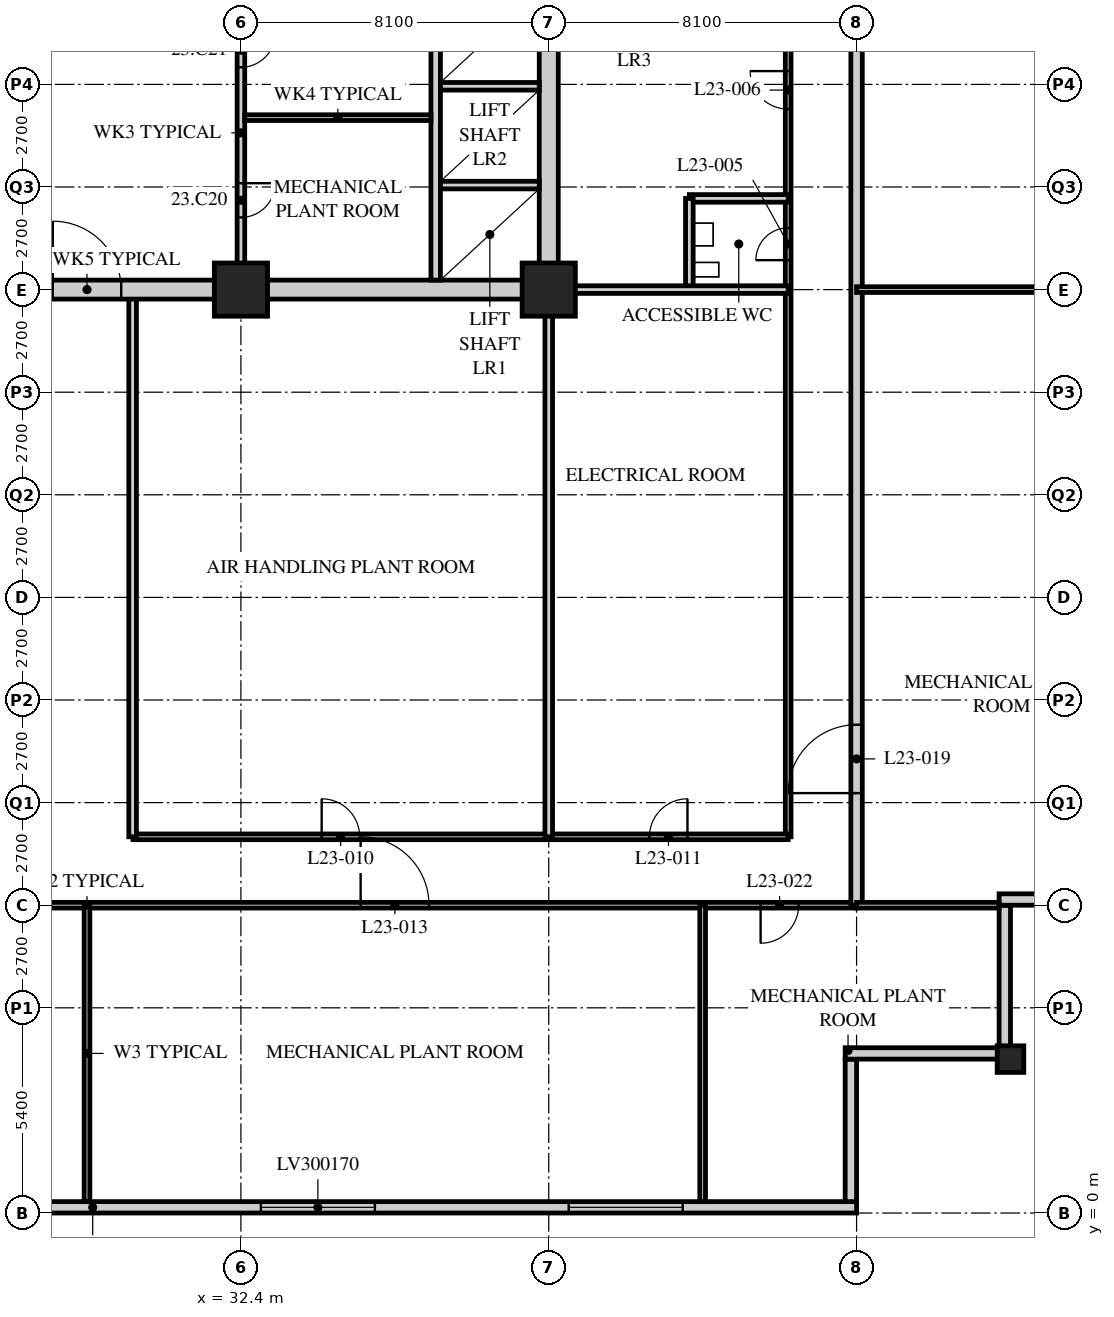
"""IFC4 building model, lengths in metres.
Left out: names, types, materials, properties, quantities, classifications, styles, units other than length and angle.
Written with IfcOpenShell. Run it as: python <this file> out.ifc"""

import sys

from ifc_helpers import new_model, si_unit, direction, frame, frame_2d, origin, origin_2d, place, context, subcontext, project, spatial, rectangle, hollow_rectangle, extrude, element, fill, save


model = new_model("IFC4")
c1 = context("Model", 3, precision=1e-05, world=origin(), true_north=direction((0.0, 1.0)))
c2 = subcontext(c1, "Body", "Model", "MODEL_VIEW")
j1 = project(units=[si_unit("LENGTHUNIT", "METRE"), si_unit("PLANEANGLEUNIT", "RADIAN")], contexts=[c1])
p1 = place(None, origin())
s1 = spatial("IfcSite", under=j1, at=p1, CompositionType="ELEMENT")
p2 = place(p1, origin())
s2 = spatial("IfcBuilding", under=s1, at=p2, CompositionType="ELEMENT")
p3 = place(p2, frame((0.0, 0.0, 90.8)))
s3 = spatial("IfcBuildingStorey", under=s2, at=p3, CompositionType="ELEMENT", Elevation=90.8)
for number, where, z_axis, x_axis in (
    (1, (32.4, 24.3, 0.0), (0.0, 0.0, 1.0), (1.0, 0.0, 0.0)),
    (2, (40.5, 24.3, 0.0), (0.0, 0.0, 1.0), (1.0, 0.0, 0.0)),
):
    element("IfcColumn", number, at=place(p3, frame(where, z_axis=z_axis, x_axis=x_axis)), inside=s3, PredefinedType="COLUMN", context=c2, shape_type="SweptSolid", body=[
        extrude(hollow_rectangle(XDim=1.4, YDim=1.4, WallThickness=0.12, at=origin_2d()), origin(), (0.0, 0.0, 1.0), 7.2),
    ])
p4 = place(p3, frame((52.65, 4.05, 0.0), z_axis=(0.0, 0.0, 1.0), x_axis=(1.0, 0.0, 0.0)))
e3 = element("IfcColumn", 3, at=p4, inside=s3, PredefinedType="COLUMN", context=c2, shape_type="SweptSolid", body=[
    extrude(hollow_rectangle(XDim=0.7, YDim=0.7, WallThickness=0.07, at=origin_2d()), origin(), (0.0, 0.0, 1.0), 7.2),
])
p5 = place(p3, frame((8.4, 0.15, 0.0), z_axis=(0.0, 0.0, 1.0), x_axis=(1.0, 0.0, 0.0)))
e4 = element("IfcWall", 4, at=p5, inside=s3, PredefinedType="SOLIDWALL", context=c2, shape_type="SweptSolid", body=[
    extrude(rectangle(XDim=40.2, YDim=0.3, at=frame_2d((20.1, 0.0))), origin(), (0.0, 0.0, 1.0), 5.85),
])
p6 = place(p5, frame((4.275, 0.0, 1.0)))
e5 = element("IfcOpeningElement", 5, at=p6, cuts=e4, PredefinedType="OPENING", context=c2, shape_type="SweptSolid", body=[
    extrude(rectangle(XDim=3.0, YDim=1.7, at=frame_2d((1.5, 0.85))), frame((0.0, 0.16, 0.0), z_axis=(0.0, -1.0, 0.0), x_axis=(1.0, 0.0, 0.0)), (0.0, 0.0, 1.0), 0.32),
])
p7 = place(p5, frame((12.375, 0.0, 1.0)))
e6 = element("IfcOpeningElement", 6, at=p7, cuts=e4, PredefinedType="OPENING", context=c2, shape_type="SweptSolid", body=[
    extrude(rectangle(XDim=3.0, YDim=1.7, at=frame_2d((1.5, 0.85))), frame((0.0, 0.16, 0.0), z_axis=(0.0, -1.0, 0.0), x_axis=(1.0, 0.0, 0.0)), (0.0, 0.0, 1.0), 0.32),
])
p8 = place(p5, frame((24.525, 0.0, 1.0)))
e7 = element("IfcOpeningElement", 7, at=p8, cuts=e4, PredefinedType="OPENING", context=c2, shape_type="SweptSolid", body=[
    extrude(rectangle(XDim=3.0, YDim=1.7, at=frame_2d((1.5, 0.85))), frame((0.0, 0.16, 0.0), z_axis=(0.0, -1.0, 0.0), x_axis=(1.0, 0.0, 0.0)), (0.0, 0.0, 1.0), 0.32),
])
p9 = place(p5, frame((32.625, 0.0, 1.0)))
e8 = element("IfcOpeningElement", 8, at=p9, cuts=e4, PredefinedType="OPENING", context=c2, shape_type="SweptSolid", body=[
    extrude(rectangle(XDim=3.0, YDim=1.7, at=frame_2d((1.5, 0.85))), frame((0.0, 0.16, 0.0), z_axis=(0.0, -1.0, 0.0), x_axis=(1.0, 0.0, 0.0)), (0.0, 0.0, 1.0), 0.32),
])
p10 = place(p3, frame((48.45, 0.3, 0.0), z_axis=(0.0, 0.0, 1.0), x_axis=(0.0, 1.0, 0.0)))
e9 = element("IfcWall", 9, at=p10, inside=s3, PredefinedType="SOLIDWALL", context=c2, shape_type="SweptSolid", body=[
    extrude(rectangle(XDim=3.75, YDim=0.3, at=frame_2d((1.875, 0.0))), origin(), (0.0, 0.0, 1.0), 5.85),
])
p11 = place(p3, frame((48.3, 4.2, 0.0), z_axis=(0.0, 0.0, 1.0), x_axis=(1.0, 0.0, 0.0)))
e10 = element("IfcWall", 10, at=p11, inside=s3, PredefinedType="SOLIDWALL", context=c2, shape_type="SweptSolid", body=[
    extrude(rectangle(XDim=4.35, YDim=0.3, at=frame_2d((2.175, 0.0))), origin(), (0.0, 0.0, 1.0), 6.25),
])
p12 = place(p3, frame((52.5, 4.35, 0.0), z_axis=(0.0, 0.0, 1.0), x_axis=(0.0, 1.0, 0.0)))
e11 = element("IfcWall", 11, at=p12, inside=s3, PredefinedType="SOLIDWALL", context=c2, shape_type="SweptSolid", body=[
    extrude(rectangle(XDim=3.75, YDim=0.3, at=frame_2d((1.875, 0.0))), origin(), (0.0, 0.0, 1.0), 6.25),
])
p13 = place(p3, frame((52.35, 8.25, 0.0), z_axis=(0.0, 0.0, 1.0), x_axis=(1.0, 0.0, 0.0)))
e12 = element("IfcWall", 12, at=p13, inside=s3, PredefinedType="SOLIDWALL", context=c2, shape_type="SweptSolid", body=[
    extrude(rectangle(XDim=4.35, YDim=0.3, at=frame_2d((2.175, 0.0))), origin(), (0.0, 0.0, 1.0), 6.95),
])
p14 = place(p3, frame((8.1, 8.1, 0.0), z_axis=(0.0, 0.0, 1.0), x_axis=(1.0, 0.0, 0.0)))
e13 = element("IfcWall", 13, at=p14, inside=s3, PredefinedType="PARTITIONING", context=c2, shape_type="SweptSolid", body=[
    extrude(rectangle(XDim=40.5, YDim=0.15, at=frame_2d((20.25, 0.0))), origin(), (0.0, 0.0, 1.0), 6.95),
])
p15 = place(p14, frame((11.25, 0.0, 0.0)))
e14 = element("IfcOpeningElement", 14, at=p15, cuts=e13, PredefinedType="OPENING", context=c2, shape_type="SweptSolid", body=[
    extrude(rectangle(XDim=1.8, YDim=2.4, at=frame_2d((0.9, 1.2))), frame((0.0, 0.085, 0.0), z_axis=(0.0, -1.0, 0.0), x_axis=(1.0, 0.0, 0.0)), (0.0, 0.0, 1.0), 0.17),
])
p16 = place(p14, frame((27.45, 0.0, 0.0)))
e15 = element("IfcOpeningElement", 15, at=p16, cuts=e13, PredefinedType="OPENING", context=c2, shape_type="SweptSolid", body=[
    extrude(rectangle(XDim=1.8, YDim=2.4, at=frame_2d((0.9, 1.2))), frame((0.0, 0.085, 0.0), z_axis=(0.0, -1.0, 0.0), x_axis=(1.0, 0.0, 0.0)), (0.0, 0.0, 1.0), 0.17),
])
p17 = place(p14, frame((1.525, 0.0, 0.0)))
e16 = element("IfcOpeningElement", 16, at=p17, cuts=e13, PredefinedType="OPENING", context=c2, shape_type="SweptSolid", body=[
    extrude(rectangle(XDim=1.0, YDim=2.1, at=frame_2d((0.5, 1.05))), frame((0.0, 0.085, 0.0), z_axis=(0.0, -1.0, 0.0), x_axis=(1.0, 0.0, 0.0)), (0.0, 0.0, 1.0), 0.17),
])
p18 = place(p14, frame((37.975, 0.0, 0.0)))
e17 = element("IfcOpeningElement", 17, at=p18, cuts=e13, PredefinedType="OPENING", context=c2, shape_type="SweptSolid", body=[
    extrude(rectangle(XDim=1.0, YDim=2.1, at=frame_2d((0.5, 1.05))), frame((0.0, 0.085, 0.0), z_axis=(0.0, -1.0, 0.0), x_axis=(1.0, 0.0, 0.0)), (0.0, 0.0, 1.0), 0.17),
])
p19 = place(p3, frame((48.6, 8.1, 0.0), z_axis=(0.0, 0.0, 1.0), x_axis=(0.0, 1.0, 0.0)))
e18 = element("IfcWall", 18, at=p19, inside=s3, PredefinedType="PARTITIONING", context=c2, shape_type="SweptSolid", body=[
    extrude(rectangle(XDim=34.2, YDim=0.3, at=frame_2d((17.1, 0.0))), origin(), (0.0, 0.0, 1.0), 5.85),
])
p20 = place(p19, frame((2.95, 0.0, 0.0)))
e19 = element("IfcOpeningElement", 19, at=p20, cuts=e18, PredefinedType="OPENING", context=c2, shape_type="SweptSolid", body=[
    extrude(rectangle(XDim=1.8, YDim=2.4, at=frame_2d((0.9, 1.2))), frame((0.0, 0.16, 0.0), z_axis=(0.0, -1.0, 0.0), x_axis=(1.0, 0.0, 0.0)), (0.0, 0.0, 1.0), 0.32),
])
p21 = place(p19, frame((27.3, 0.0, 0.0)))
e20 = element("IfcOpeningElement", 20, at=p21, cuts=e18, PredefinedType="OPENING", context=c2, shape_type="SweptSolid", body=[
    extrude(rectangle(XDim=1.8, YDim=2.4, at=frame_2d((0.9, 1.2))), frame((0.0, 0.16, 0.0), z_axis=(0.0, -1.0, 0.0), x_axis=(1.0, 0.0, 0.0)), (0.0, 0.0, 1.0), 0.32),
])
p22 = place(p3, frame((46.8, 9.9, 0.0), z_axis=(0.0, 0.0, 1.0), x_axis=(0.0, 1.0, 0.0)))
e21 = element("IfcWall", 21, at=p22, inside=s3, PredefinedType="PARTITIONING", context=c2, shape_type="SweptSolid", body=[
    extrude(rectangle(XDim=30.6, YDim=0.15, at=frame_2d((15.3, 0.0))), origin(), (0.0, 0.0, 1.0), 6.95),
])
p23 = place(p22, frame((15.175, 0.0, 0.0)))
e22 = element("IfcOpeningElement", 22, at=p23, cuts=e21, PredefinedType="OPENING", context=c2, shape_type="SweptSolid", body=[
    extrude(rectangle(XDim=0.85, YDim=2.1, at=frame_2d((0.425, 1.05))), frame((0.0, 0.085, 0.0), z_axis=(0.0, -1.0, 0.0), x_axis=(1.0, 0.0, 0.0)), (0.0, 0.0, 1.0), 0.17),
])
p24 = place(p22, frame((19.15, 0.0, 0.0)))
e23 = element("IfcOpeningElement", 23, at=p24, cuts=e21, PredefinedType="OPENING", context=c2, shape_type="SweptSolid", body=[
    extrude(rectangle(XDim=1.0, YDim=2.1, at=frame_2d((0.5, 1.05))), frame((0.0, 0.085, 0.0), z_axis=(0.0, -1.0, 0.0), x_axis=(1.0, 0.0, 0.0)), (0.0, 0.0, 1.0), 0.17),
])
p25 = place(p22, frame((26.05, 0.0, 0.0)))
e24 = element("IfcOpeningElement", 24, at=p25, cuts=e21, PredefinedType="OPENING", context=c2, shape_type="SweptSolid", body=[
    extrude(rectangle(XDim=1.0, YDim=2.1, at=frame_2d((0.5, 1.05))), frame((0.0, 0.085, 0.0), z_axis=(0.0, -1.0, 0.0), x_axis=(1.0, 0.0, 0.0)), (0.0, 0.0, 1.0), 0.17),
])
p26 = place(p3, frame((29.56, 9.9, 0.0), z_axis=(0.0, 0.0, 1.0), x_axis=(1.0, 0.0, 0.0)))
e25 = element("IfcWall", 25, at=p26, inside=s3, PredefinedType="PARTITIONING", context=c2, shape_type="SweptSolid", body=[
    extrude(rectangle(XDim=17.24, YDim=0.15, at=frame_2d((8.62, 0.0))), origin(), (0.0, 0.0, 1.0), 6.95),
])
p27 = place(p26, frame((4.965, 0.0, 0.0)))
e26 = element("IfcOpeningElement", 26, at=p27, cuts=e25, PredefinedType="OPENING", context=c2, shape_type="SweptSolid", body=[
    extrude(rectangle(XDim=1.0, YDim=2.1, at=frame_2d((0.5, 1.05))), frame((0.0, 0.085, 0.0), z_axis=(0.0, -1.0, 0.0), x_axis=(1.0, 0.0, 0.0)), (0.0, 0.0, 1.0), 0.17),
])
p28 = place(p26, frame((13.59, 0.0, 0.0)))
e27 = element("IfcOpeningElement", 27, at=p28, cuts=e25, PredefinedType="OPENING", context=c2, shape_type="SweptSolid", body=[
    extrude(rectangle(XDim=1.0, YDim=2.1, at=frame_2d((0.5, 1.05))), frame((0.0, 0.085, 0.0), z_axis=(0.0, -1.0, 0.0), x_axis=(1.0, 0.0, 0.0)), (0.0, 0.0, 1.0), 0.17),
])
p29 = place(p3, frame((46.8, 26.7, 0.0), z_axis=(0.0, 0.0, 1.0), x_axis=(-1.0, 0.0, 0.0)))
e28 = element("IfcWall", 28, at=p29, inside=s3, PredefinedType="SOLIDWALL", context=c2, shape_type="SweptSolid", body=[
    extrude(rectangle(XDim=2.6, YDim=0.2, at=frame_2d((1.3, 0.0))), origin(), (0.0, 0.0, 1.0), 6.95),
])
p30 = place(p3, frame((44.2, 24.3, 0.0), z_axis=(0.0, 0.0, 1.0), x_axis=(0.0, 1.0, 0.0)))
e29 = element("IfcWall", 29, at=p30, inside=s3, PredefinedType="SOLIDWALL", context=c2, shape_type="SweptSolid", body=[
    extrude(rectangle(XDim=2.4, YDim=0.2, at=frame_2d((1.2, 0.0))), origin(), (0.0, 0.0, 1.0), 6.95),
])
p31 = place(p3, frame((40.5, 9.9, 0.0), z_axis=(0.0, 0.0, 1.0), x_axis=(0.0, 1.0, 0.0)))
e30 = element("IfcWall", 30, at=p31, inside=s3, PredefinedType="SOLIDWALL", context=c2, shape_type="SweptSolid", body=[
    extrude(rectangle(XDim=14.4, YDim=0.2, at=frame_2d((7.2, 0.0))), origin(), (0.0, 0.0, 1.0), 5.85),
])
p32 = place(p3, frame((29.55, 9.9, 0.0), z_axis=(0.0, 0.0, 1.0), x_axis=(0.0, 1.0, 0.0)))
e31 = element("IfcWall", 31, at=p32, inside=s3, PredefinedType="SOLIDWALL", context=c2, shape_type="SweptSolid", body=[
    extrude(rectangle(XDim=14.4, YDim=0.2, at=frame_2d((7.2, 0.0))), origin(), (0.0, 0.0, 1.0), 6.95),
])
p33 = place(p3, frame((40.5, 24.3, 0.0), z_axis=(0.0, 0.0, 1.0), x_axis=(1.0, 0.0, 0.0)))
e32 = element("IfcWall", 32, at=p33, inside=s3, PredefinedType="SOLIDWALL", context=c2, shape_type="SweptSolid", body=[
    extrude(rectangle(XDim=6.3, YDim=0.2, at=frame_2d((3.15, 0.0))), origin(), (0.0, 0.0, 1.0), 5.85),
])
p34 = place(p3, frame((28.35, 8.1, 0.0), z_axis=(0.0, 0.0, 1.0), x_axis=(0.0, -1.0, 0.0)))
e33 = element("IfcWall", 33, at=p34, inside=s3, PredefinedType="PARTITIONING", context=c2, shape_type="SweptSolid", body=[
    extrude(rectangle(XDim=7.8, YDim=0.15, at=frame_2d((3.9, 0.0))), origin(), (0.0, 0.0, 1.0), 6.95),
])
p35 = place(p3, frame((48.6, 24.3, 0.0), z_axis=(0.0, 0.0, 1.0), x_axis=(1.0, 0.0, 0.0)))
e34 = element("IfcWall", 34, at=p35, inside=s3, PredefinedType="PARTITIONING", context=c2, shape_type="SweptSolid", body=[
    extrude(rectangle(XDim=7.8, YDim=0.15, at=frame_2d((3.9, 0.0))), origin(), (0.0, 0.0, 1.0), 5.85),
])
p36 = place(p3, frame((48.6, 8.1, 0.0), z_axis=(0.0, 0.0, 1.0), x_axis=(1.0, 0.0, 0.0)))
e35 = element("IfcWall", 35, at=p36, inside=s3, PredefinedType="PARTITIONING", context=c2, shape_type="SweptSolid", body=[
    extrude(rectangle(XDim=3.75, YDim=0.15, at=frame_2d((1.875, 0.0))), origin(), (0.0, 0.0, 1.0), 6.95),
])
p37 = place(p3, frame((44.55, 8.1, 0.0), z_axis=(0.0, 0.0, 1.0), x_axis=(0.0, -1.0, 0.0)))
e36 = element("IfcWall", 36, at=p37, inside=s3, PredefinedType="PARTITIONING", context=c2, shape_type="SweptSolid", body=[
    extrude(rectangle(XDim=7.8, YDim=0.15, at=frame_2d((3.9, 0.0))), origin(), (0.0, 0.0, 1.0), 6.95),
])
p38 = place(p3, frame((15.95, 24.3, 0.0), z_axis=(0.0, 0.0, 1.0), x_axis=(1.0, 0.0, 0.0)))
e37 = element("IfcWall", 37, at=p38, inside=s3, PredefinedType="SOLIDWALL", context=c2, shape_type="SweptSolid", body=[
    extrude(rectangle(XDim=24.8, YDim=0.5, at=frame_2d((12.4, 0.0))), origin(), (0.0, 0.0, 1.0), 6.188),
])
p39 = place(p38, frame((11.5, 0.0, 0.0)))
e38 = element("IfcOpeningElement", 38, at=p39, cuts=e37, PredefinedType="OPENING", context=c2, shape_type="SweptSolid", body=[
    extrude(rectangle(XDim=1.8, YDim=2.4, at=frame_2d((0.9, 1.2))), frame((0.0, 0.26, 0.0), z_axis=(0.0, -1.0, 0.0), x_axis=(1.0, 0.0, 0.0)), (0.0, 0.0, 1.0), 0.52),
])
p40 = place(p3, frame((40.5, 24.55, 0.0), z_axis=(0.0, 0.0, 1.0), x_axis=(0.0, 1.0, 0.0)))
e39 = element("IfcWall", 39, at=p40, inside=s3, PredefinedType="SOLIDWALL", context=c2, shape_type="SweptSolid", body=[
    extrude(rectangle(XDim=15.7, YDim=0.5, at=frame_2d((7.85, 0.0))), origin(), (0.0, 0.0, 1.0), 5.85),
])
p41 = place(p3, frame((37.525, 24.55, 0.0), z_axis=(0.0, 0.0, 1.0), x_axis=(0.0, 1.0, 0.0)))
e40 = element("IfcWall", 40, at=p41, inside=s3, PredefinedType="SOLIDWALL", context=c2, shape_type="SweptSolid", body=[
    extrude(rectangle(XDim=7.75, YDim=0.25, at=frame_2d((3.875, 0.0))), origin(), (0.0, 0.0, 1.0), 6.95),
])
for number, where, z_axis, x_axis in (
    (41, (37.65, 27.05, 0.0), (0.0, 0.0, 1.0), (1.0, 0.0, 0.0)),
    (42, (37.65, 29.65, 0.0), (0.0, 0.0, 1.0), (1.0, 0.0, 0.0)),
):
    element("IfcWall", number, at=place(p3, frame(where, z_axis=z_axis, x_axis=x_axis)), inside=s3, PredefinedType="SOLIDWALL", context=c2, shape_type="SweptSolid", body=[
        extrude(rectangle(XDim=2.6, YDim=0.2, at=frame_2d((1.3, 0.0))), origin(), (0.0, 0.0, 1.0), 6.95),
    ])
p42 = place(p3, frame((32.4, 24.55, 0.0), z_axis=(0.0, 0.0, 1.0), x_axis=(0.0, 1.0, 0.0)))
e43 = element("IfcWall", 43, at=p42, inside=s3, PredefinedType="PARTITIONING", context=c2, shape_type="SweptSolid", body=[
    extrude(rectangle(XDim=7.75, YDim=0.2, at=frame_2d((3.875, 0.0))), origin(), (0.0, 0.0, 1.0), 6.25),
])
p43 = place(p42, frame((1.65, 0.0, 0.0)))
e44 = element("IfcOpeningElement", 44, at=p43, cuts=e43, PredefinedType="OPENING", context=c2, shape_type="SweptSolid", body=[
    extrude(rectangle(XDim=0.9, YDim=2.1, at=frame_2d((0.45, 1.05))), frame((0.0, 0.11, 0.0), z_axis=(0.0, -1.0, 0.0), x_axis=(1.0, 0.0, 0.0)), (0.0, 0.0, 1.0), 0.22),
])
p44 = place(p42, frame((5.6, 0.0, 0.0)))
e45 = element("IfcOpeningElement", 45, at=p44, cuts=e43, PredefinedType="OPENING", context=c2, shape_type="SweptSolid", body=[
    extrude(rectangle(XDim=0.9, YDim=2.1, at=frame_2d((0.45, 1.05))), frame((0.0, 0.11, 0.0), z_axis=(0.0, -1.0, 0.0), x_axis=(1.0, 0.0, 0.0)), (0.0, 0.0, 1.0), 0.22),
])
p45 = place(p3, frame((32.5, 28.825, 0.0), z_axis=(0.0, 0.0, 1.0), x_axis=(1.0, 0.0, 0.0)))
e46 = element("IfcWall", 46, at=p45, inside=s3, PredefinedType="PARTITIONING", context=c2, shape_type="SweptSolid", body=[
    extrude(rectangle(XDim=4.9, YDim=0.15, at=frame_2d((2.45, 0.0))), origin(), (0.0, 0.0, 1.0), 6.95),
])
p46 = place(p8, origin())
e47 = element("IfcWindow", 47, at=p46, inside=s3, PartitioningType="SINGLE_PANEL", PredefinedType="USERDEFINED", context=c2, shape_type="SweptSolid", body=[
    extrude(rectangle(XDim=3.0, YDim=1.7, at=frame_2d((1.5, 0.85))), frame((0.0, 0.075, 0.0), z_axis=(0.0, -1.0, 0.0), x_axis=(1.0, 0.0, 0.0)), (0.0, 0.0, 1.0), 0.15),
])
fill(e7, e47)
p47 = place(p9, origin())
e48 = element("IfcWindow", 48, at=p47, inside=s3, PartitioningType="SINGLE_PANEL", PredefinedType="USERDEFINED", context=c2, shape_type="SweptSolid", body=[
    extrude(rectangle(XDim=3.0, YDim=1.7, at=frame_2d((1.5, 0.85))), frame((0.0, 0.075, 0.0), z_axis=(0.0, -1.0, 0.0), x_axis=(1.0, 0.0, 0.0)), (0.0, 0.0, 1.0), 0.15),
])
fill(e8, e48)
p48 = place(p23, origin())
e49 = element("IfcDoor", 49, at=p48, inside=s3, OperationType="SINGLE_SWING_LEFT", PredefinedType="DOOR", context=c2, shape_type="SweptSolid", body=[
    extrude(rectangle(XDim=0.85, YDim=2.1, at=frame_2d((0.425, 1.05))), frame((0.0, 0.025, 0.0), z_axis=(0.0, -1.0, 0.0), x_axis=(1.0, 0.0, 0.0)), (0.0, 0.0, 1.0), 0.05),
])
fill(e22, e49)
p49 = place(p24, origin())
e50 = element("IfcDoor", 50, at=p49, inside=s3, OperationType="SINGLE_SWING_RIGHT", PredefinedType="DOOR", context=c2, shape_type="SweptSolid", body=[
    extrude(rectangle(XDim=1.0, YDim=2.1, at=frame_2d((0.5, 1.05))), frame((0.0, 0.025, 0.0), z_axis=(0.0, -1.0, 0.0), x_axis=(1.0, 0.0, 0.0)), (0.0, 0.0, 1.0), 0.05),
])
fill(e23, e50)
p50 = place(p27, origin())
e51 = element("IfcDoor", 51, at=p50, inside=s3, OperationType="SINGLE_SWING_LEFT", PredefinedType="DOOR", context=c2, shape_type="SweptSolid", body=[
    extrude(rectangle(XDim=1.0, YDim=2.1, at=frame_2d((0.5, 1.05))), frame((0.0, 0.025, 0.0), z_axis=(0.0, -1.0, 0.0), x_axis=(1.0, 0.0, 0.0)), (0.0, 0.0, 1.0), 0.05),
])
fill(e26, e51)
p51 = place(p28, origin())
e52 = element("IfcDoor", 52, at=p51, inside=s3, OperationType="SINGLE_SWING_RIGHT", PredefinedType="DOOR", context=c2, shape_type="SweptSolid", body=[
    extrude(rectangle(XDim=1.0, YDim=2.1, at=frame_2d((0.5, 1.05))), frame((0.0, 0.025, 0.0), z_axis=(0.0, -1.0, 0.0), x_axis=(1.0, 0.0, 0.0)), (0.0, 0.0, 1.0), 0.05),
])
fill(e27, e52)
p52 = place(p16, origin())
e53 = element("IfcDoor", 53, at=p52, inside=s3, OperationType="DOUBLE_DOOR_SINGLE_SWING", PredefinedType="DOOR", context=c2, shape_type="SweptSolid", body=[
    extrude(rectangle(XDim=1.8, YDim=2.4, at=frame_2d((0.9, 1.2))), frame((0.0, 0.025, 0.0), z_axis=(0.0, -1.0, 0.0), x_axis=(1.0, 0.0, 0.0)), (0.0, 0.0, 1.0), 0.05),
])
fill(e15, e53)
p53 = place(p20, origin())
e54 = element("IfcDoor", 54, at=p53, inside=s3, OperationType="DOUBLE_DOOR_SINGLE_SWING", PredefinedType="DOOR", context=c2, shape_type="SweptSolid", body=[
    extrude(rectangle(XDim=1.8, YDim=2.4, at=frame_2d((0.9, 1.2))), frame((0.0, 0.025, 0.0), z_axis=(0.0, -1.0, 0.0), x_axis=(1.0, 0.0, 0.0)), (0.0, 0.0, 1.0), 0.05),
])
fill(e19, e54)
p54 = place(p18, origin())
e55 = element("IfcDoor", 55, at=p54, inside=s3, OperationType="SINGLE_SWING_RIGHT", PredefinedType="DOOR", context=c2, shape_type="SweptSolid", body=[
    extrude(rectangle(XDim=1.0, YDim=2.1, at=frame_2d((0.5, 1.05))), frame((0.0, 0.025, 0.0), z_axis=(0.0, -1.0, 0.0), x_axis=(1.0, 0.0, 0.0)), (0.0, 0.0, 1.0), 0.05),
])
fill(e17, e55)
p55 = place(p43, origin())
e56 = element("IfcDoor", 56, at=p55, inside=s3, OperationType="SINGLE_SWING_LEFT", PredefinedType="DOOR", context=c2, shape_type="SweptSolid", body=[
    extrude(rectangle(XDim=0.9, YDim=2.1, at=frame_2d((0.45, 1.05))), frame((0.0, 0.025, 0.0), z_axis=(0.0, -1.0, 0.0), x_axis=(1.0, 0.0, 0.0)), (0.0, 0.0, 1.0), 0.05),
])
fill(e44, e56)
p56 = place(p44, origin())
e57 = element("IfcDoor", 57, at=p56, inside=s3, OperationType="SINGLE_SWING_LEFT", PredefinedType="DOOR", context=c2, shape_type="SweptSolid", body=[
    extrude(rectangle(XDim=0.9, YDim=2.1, at=frame_2d((0.45, 1.05))), frame((0.0, 0.025, 0.0), z_axis=(0.0, -1.0, 0.0), x_axis=(1.0, 0.0, 0.0)), (0.0, 0.0, 1.0), 0.05),
])
fill(e45, e57)
p57 = place(p39, origin())
e58 = element("IfcDoor", 58, at=p57, inside=s3, OperationType="DOUBLE_DOOR_SINGLE_SWING", PredefinedType="DOOR", context=c2, shape_type="SweptSolid", body=[
    extrude(rectangle(XDim=1.8, YDim=2.4, at=frame_2d((0.9, 1.2))), frame((0.0, 0.025, 0.0), z_axis=(0.0, -1.0, 0.0), x_axis=(1.0, 0.0, 0.0)), (0.0, 0.0, 1.0), 0.05),
])
fill(e38, e58)
save(model, sys.argv[1])
